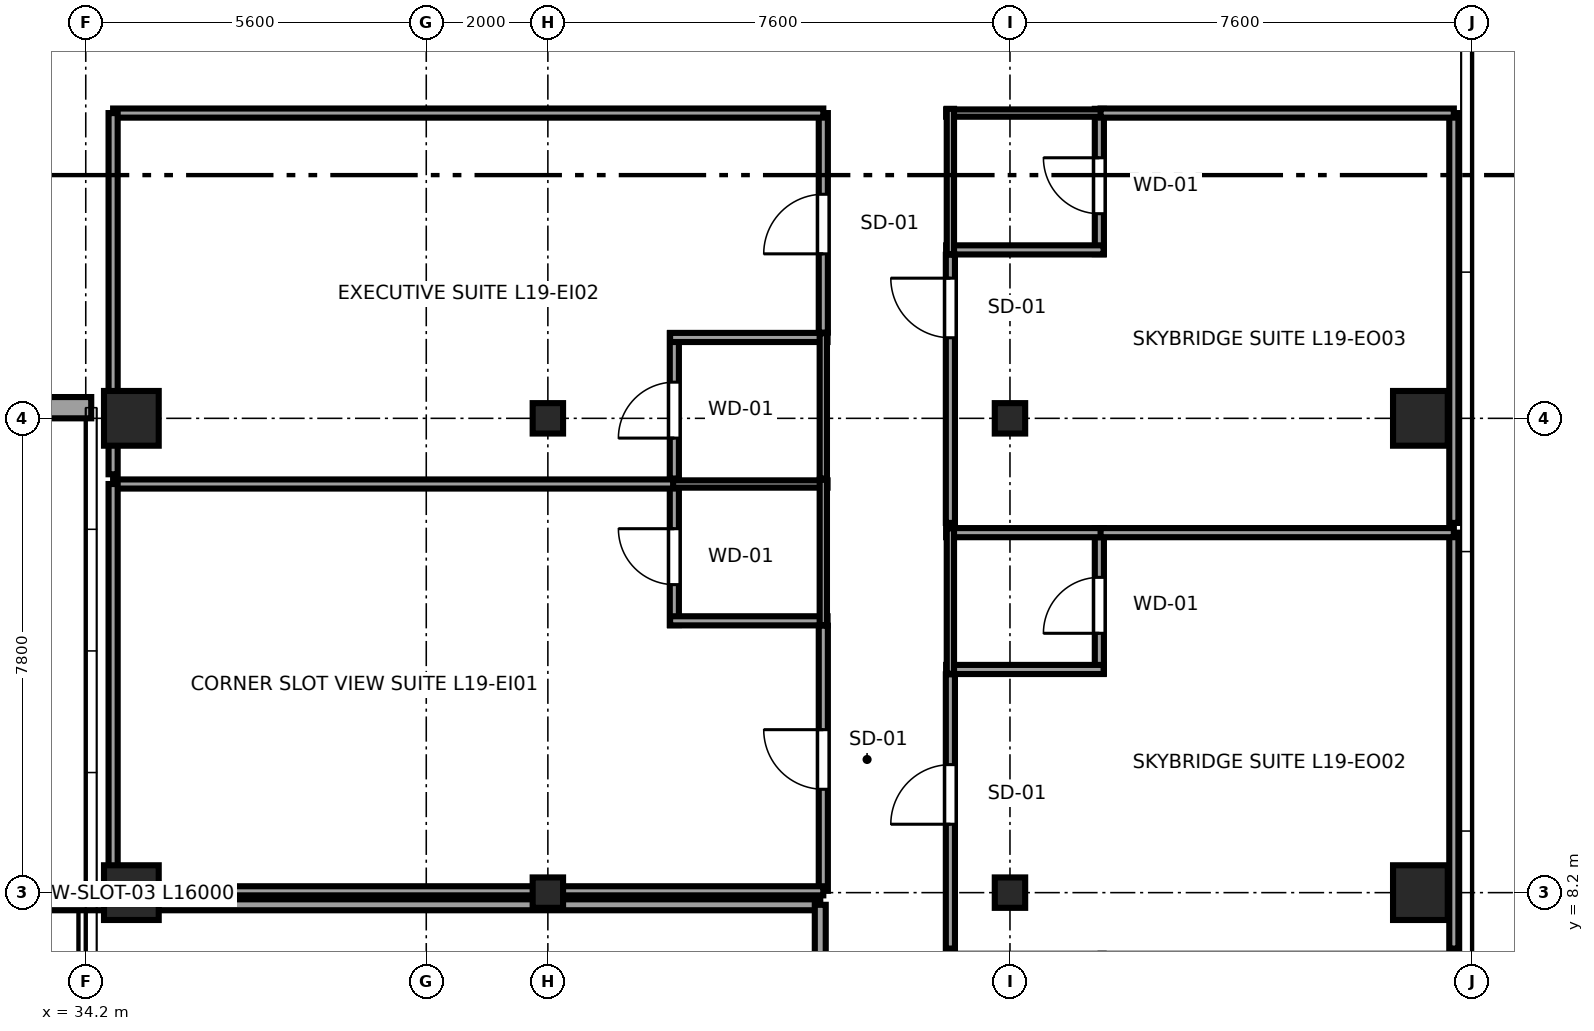
"""IFC4 building model, lengths in metres.
Left out: names, types, materials, properties, quantities, classifications, styles, units other than length and angle.
Written with IfcOpenShell. Run it as: python <this file> out.ifc"""

import sys

from ifc_helpers import new_model, si_unit, direction, frame, frame_2d, origin, origin_2d, place, context, subcontext, project, spatial, rectangle, i_section, extrude, source, transform, mapped, element, fill, save


model = new_model("IFC4")
c1 = context("Model", 3, precision=1e-05, world=origin(), true_north=direction((0.0, 1.0)))
c2 = subcontext(c1, "Body", "Model", "MODEL_VIEW")
j1 = project(units=[si_unit("LENGTHUNIT", "METRE"), si_unit("PLANEANGLEUNIT", "RADIAN")], contexts=[c1])
p1 = place(None, origin())
s1 = spatial("IfcSite", under=j1, at=p1, CompositionType="ELEMENT")
p2 = place(p1, origin())
s2 = spatial("IfcBuilding", under=s1, at=p2, CompositionType="ELEMENT")
p3 = place(p2, frame((0.0, 0.0, 78.15)))
s3 = spatial("IfcBuildingStorey", under=s2, at=p3, CompositionType="ELEMENT", Elevation=78.15)
m1 = source(origin(), c2, "Body", "SweptSolid", [
    extrude(rectangle(XDim=0.9, YDim=0.9, at=origin_2d()), origin(), (0.0, 0.0, 1.0), 3.55),
])
for number, where, z_axis, x_axis in (
    (1, (34.95, 8.2, 0.0), (0.0, 0.0, 1.0), (1.0, 0.0, 0.0)),
    (2, (34.95, 16.0, 0.0), (0.0, 0.0, 1.0), (1.0, 0.0, 0.0)),
):
    element("IfcColumn", number, at=place(p3, frame(where, z_axis=z_axis, x_axis=x_axis)), inside=s3, PredefinedType="COLUMN", context=c2, shape_type="MappedRepresentation", body=[
        mapped(m1, transform((0.0, 0.0, 0.0), x_axis=(1.0, 0.0, 0.0), y_axis=(0.0, 1.0, 0.0), z_axis=(0.0, 0.0, 1.0), scale=1.0)),
    ])
m2 = source(origin(), c2, "Body", "SweptSolid", [
    extrude(i_section(OverallWidth=0.5, OverallDepth=0.5, WebThickness=0.022, FlangeThickness=0.034, at=origin_2d()), origin(), (0.0, 0.0, 1.0), 3.55),
])
for number, where, z_axis, x_axis in (
    (3, (41.8, 8.2, 0.0), (0.0, 0.0, 1.0), (1.0, 0.0, 0.0)),
    (4, (41.8, 16.0, 0.0), (0.0, 0.0, 1.0), (1.0, 0.0, 0.0)),
    (5, (49.4, 8.2, 0.0), (0.0, 0.0, 1.0), (1.0, 0.0, 0.0)),
    (6, (49.4, 16.0, 0.0), (0.0, 0.0, 1.0), (1.0, 0.0, 0.0)),
):
    element("IfcColumn", number, at=place(p3, frame(where, z_axis=z_axis, x_axis=x_axis)), inside=s3, PredefinedType="COLUMN", context=c2, shape_type="MappedRepresentation", body=[
        mapped(m2, transform((0.0, 0.0, 0.0), x_axis=(1.0, 0.0, 0.0), y_axis=(0.0, 1.0, 0.0), z_axis=(0.0, 0.0, 1.0), scale=1.0)),
    ])
for number, where, z_axis, x_axis in (
    (7, (56.15, 8.2, 0.0), (0.0, 0.0, 1.0), (1.0, 0.0, 0.0)),
    (8, (56.15, 16.0, 0.0), (0.0, 0.0, 1.0), (1.0, 0.0, 0.0)),
):
    element("IfcColumn", number, at=place(p3, frame(where, z_axis=z_axis, x_axis=x_axis)), inside=s3, PredefinedType="COLUMN", context=c2, shape_type="MappedRepresentation", body=[
        mapped(m1, transform((0.0, 0.0, 0.0), x_axis=(1.0, 0.0, 0.0), y_axis=(0.0, 1.0, 0.0), z_axis=(0.0, 0.0, 1.0), scale=1.0)),
    ])
p4 = place(p3, frame((22.71, 16.175, 0.0), z_axis=(0.0, 0.0, 1.0), x_axis=(1.0, 0.0, 0.0)))
e9 = element("IfcWall", 9, at=p4, inside=s3, PredefinedType="SOLIDWALL", context=c2, shape_type="SweptSolid", body=[
    extrude(rectangle(XDim=11.58, YDim=0.35, at=frame_2d((5.79, 0.0))), origin(), (0.0, 0.0, 1.0), 2.748),
])
p5 = place(p4, frame((2.22, 0.0, 0.68)))
e10 = element("IfcOpeningElement", 10, at=p5, cuts=e9, PredefinedType="OPENING", context=c2, shape_type="SweptSolid", body=[
    extrude(rectangle(XDim=1.95, YDim=1.82, at=frame_2d((0.975, 0.91))), frame((0.0, 0.185, 0.0), z_axis=(0.0, -1.0, 0.0), x_axis=(1.0, 0.0, 0.0)), (0.0, 0.0, 1.0), 0.37),
])
p6 = place(p4, frame((7.41, 0.0, 0.68)))
e11 = element("IfcOpeningElement", 11, at=p6, cuts=e9, PredefinedType="OPENING", context=c2, shape_type="SweptSolid", body=[
    extrude(rectangle(XDim=1.95, YDim=1.82, at=frame_2d((0.975, 0.91))), frame((0.0, 0.185, 0.0), z_axis=(0.0, -1.0, 0.0), x_axis=(1.0, 0.0, 0.0)), (0.0, 0.0, 1.0), 0.37),
])
p7 = place(p3, frame((43.88, 12.6, 0.0), z_axis=(0.0, 0.0, 1.0), x_axis=(0.0, 1.0, 0.0)))
e12 = element("IfcWall", 12, at=p7, inside=s3, PredefinedType="PARTITIONING", context=c2, shape_type="SweptSolid", body=[
    extrude(rectangle(XDim=2.39, YDim=0.15, at=frame_2d((1.195, 0.0))), origin(), (0.0, 0.0, 1.0), 3.37),
])
p8 = place(p7, frame((0.665, 0.0, 0.0)))
e13 = element("IfcOpeningElement", 13, at=p8, cuts=e12, PredefinedType="OPENING", context=c2, shape_type="SweptSolid", body=[
    extrude(rectangle(XDim=0.92, YDim=2.01, at=frame_2d((0.46, 1.005))), frame((0.0, 0.085, 0.0), z_axis=(0.0, -1.0, 0.0), x_axis=(1.0, 0.0, 0.0)), (0.0, 0.0, 1.0), 0.17),
])
p9 = place(p3, frame((43.81, 12.67, 0.0), z_axis=(0.0, 0.0, 1.0), x_axis=(1.0, 0.0, 0.0)))
e14 = element("IfcWall", 14, at=p9, inside=s3, PredefinedType="PARTITIONING", context=c2, shape_type="SweptSolid", body=[
    extrude(rectangle(XDim=2.59, YDim=0.15, at=frame_2d((1.295, 0.0))), origin(), (0.0, 0.0, 1.0), 3.37),
])
p10 = place(p3, frame((43.81, 14.92, 0.0), z_axis=(0.0, 0.0, 1.0), x_axis=(1.0, 0.0, 0.0)))
e15 = element("IfcWall", 15, at=p10, inside=s3, PredefinedType="PLUMBINGWALL", context=c2, shape_type="SweptSolid", body=[
    extrude(rectangle(XDim=2.59, YDim=0.12, at=frame_2d((1.295, 0.0))), origin(), (0.0, 0.0, 1.0), 3.37),
])
p11 = place(p3, frame((46.33, 12.6, 0.0), z_axis=(0.0, 0.0, 1.0), x_axis=(0.0, 1.0, 0.0)))
e16 = element("IfcWall", 16, at=p11, inside=s3, PredefinedType="PLUMBINGWALL", context=c2, shape_type="SweptSolid", body=[
    extrude(rectangle(XDim=2.39, YDim=0.12, at=frame_2d((1.195, 0.0))), origin(), (0.0, 0.0, 1.0), 3.37),
])
p12 = place(p3, frame((43.88, 15.01, 0.0), z_axis=(0.0, 0.0, 1.0), x_axis=(0.0, 1.0, 0.0)))
e17 = element("IfcWall", 17, at=p12, inside=s3, PredefinedType="PARTITIONING", context=c2, shape_type="SweptSolid", body=[
    extrude(rectangle(XDim=2.39, YDim=0.15, at=frame_2d((1.195, 0.0))), origin(), (0.0, 0.0, 1.0), 3.37),
])
p13 = place(p12, frame((0.665, 0.0, 0.0)))
e18 = element("IfcOpeningElement", 18, at=p13, cuts=e17, PredefinedType="OPENING", context=c2, shape_type="SweptSolid", body=[
    extrude(rectangle(XDim=0.92, YDim=2.01, at=frame_2d((0.46, 1.005))), frame((0.0, 0.085, 0.0), z_axis=(0.0, -1.0, 0.0), x_axis=(1.0, 0.0, 0.0)), (0.0, 0.0, 1.0), 0.17),
])
p14 = place(p3, frame((43.81, 17.33, 0.0), z_axis=(0.0, 0.0, 1.0), x_axis=(1.0, 0.0, 0.0)))
e19 = element("IfcWall", 19, at=p14, inside=s3, PredefinedType="PARTITIONING", context=c2, shape_type="SweptSolid", body=[
    extrude(rectangle(XDim=2.59, YDim=0.15, at=frame_2d((1.295, 0.0))), origin(), (0.0, 0.0, 1.0), 3.37),
])
p15 = place(p3, frame((46.33, 15.01, 0.0), z_axis=(0.0, 0.0, 1.0), x_axis=(0.0, 1.0, 0.0)))
e20 = element("IfcWall", 20, at=p15, inside=s3, PredefinedType="PLUMBINGWALL", context=c2, shape_type="SweptSolid", body=[
    extrude(rectangle(XDim=2.39, YDim=0.12, at=frame_2d((1.195, 0.0))), origin(), (0.0, 0.0, 1.0), 3.37),
])
p16 = place(p3, frame((50.87, 11.8, 0.0), z_axis=(0.0, 0.0, 1.0), x_axis=(0.0, 1.0, 0.0)))
e21 = element("IfcWall", 21, at=p16, inside=s3, PredefinedType="PARTITIONING", context=c2, shape_type="SweptSolid", body=[
    extrude(rectangle(XDim=2.39, YDim=0.15, at=frame_2d((1.195, 0.0))), origin(), (0.0, 0.0, 1.0), 3.37),
])
p17 = place(p16, frame((0.665, 0.0, 0.0)))
e22 = element("IfcOpeningElement", 22, at=p17, cuts=e21, PredefinedType="OPENING", context=c2, shape_type="SweptSolid", body=[
    extrude(rectangle(XDim=0.92, YDim=2.01, at=frame_2d((0.46, 1.005))), frame((0.0, 0.085, 0.0), z_axis=(0.0, -1.0, 0.0), x_axis=(1.0, 0.0, 0.0)), (0.0, 0.0, 1.0), 0.17),
])
for number, where, z_axis, x_axis in (
    (23, (48.35, 11.87, 0.0), (0.0, 0.0, 1.0), (1.0, 0.0, 0.0)),
    (24, (48.35, 14.12, 0.0), (0.0, 0.0, 1.0), (1.0, 0.0, 0.0)),
):
    element("IfcWall", number, at=place(p3, frame(where, z_axis=z_axis, x_axis=x_axis)), inside=s3, PredefinedType="PARTITIONING", context=c2, shape_type="SweptSolid", body=[
        extrude(rectangle(XDim=2.59, YDim=0.15, at=frame_2d((1.295, 0.0))), origin(), (0.0, 0.0, 1.0), 3.37),
    ])
p18 = place(p3, frame((48.42, 11.8, 0.0), z_axis=(0.0, 0.0, 1.0), x_axis=(0.0, 1.0, 0.0)))
e25 = element("IfcWall", 25, at=p18, inside=s3, PredefinedType="PLUMBINGWALL", context=c2, shape_type="SweptSolid", body=[
    extrude(rectangle(XDim=2.39, YDim=0.12, at=frame_2d((1.195, 0.0))), origin(), (0.0, 0.0, 1.0), 3.37),
])
p19 = place(p3, frame((50.87, 18.7, 0.0), z_axis=(0.0, 0.0, 1.0), x_axis=(0.0, 1.0, 0.0)))
e26 = element("IfcWall", 26, at=p19, inside=s3, PredefinedType="PARTITIONING", context=c2, shape_type="SweptSolid", body=[
    extrude(rectangle(XDim=2.39, YDim=0.15, at=frame_2d((1.195, 0.0))), origin(), (0.0, 0.0, 1.0), 3.37),
])
p20 = place(p19, frame((0.665, 0.0, 0.0)))
e27 = element("IfcOpeningElement", 27, at=p20, cuts=e26, PredefinedType="OPENING", context=c2, shape_type="SweptSolid", body=[
    extrude(rectangle(XDim=0.92, YDim=2.01, at=frame_2d((0.46, 1.005))), frame((0.0, 0.085, 0.0), z_axis=(0.0, -1.0, 0.0), x_axis=(1.0, 0.0, 0.0)), (0.0, 0.0, 1.0), 0.17),
])
p21 = place(p3, frame((48.35, 18.77, 0.0), z_axis=(0.0, 0.0, 1.0), x_axis=(1.0, 0.0, 0.0)))
e28 = element("IfcWall", 28, at=p21, inside=s3, PredefinedType="PARTITIONING", context=c2, shape_type="SweptSolid", body=[
    extrude(rectangle(XDim=2.59, YDim=0.15, at=frame_2d((1.295, 0.0))), origin(), (0.0, 0.0, 1.0), 3.37),
])
p22 = place(p3, frame((48.35, 21.02, 0.0), z_axis=(0.0, 0.0, 1.0), x_axis=(1.0, 0.0, 0.0)))
e29 = element("IfcWall", 29, at=p22, inside=s3, PredefinedType="PLUMBINGWALL", context=c2, shape_type="SweptSolid", body=[
    extrude(rectangle(XDim=2.59, YDim=0.12, at=frame_2d((1.295, 0.0))), origin(), (0.0, 0.0, 1.0), 3.37),
])
p23 = place(p3, frame((48.42, 18.7, 0.0), z_axis=(0.0, 0.0, 1.0), x_axis=(0.0, 1.0, 0.0)))
e30 = element("IfcWall", 30, at=p23, inside=s3, PredefinedType="PLUMBINGWALL", context=c2, shape_type="SweptSolid", body=[
    extrude(rectangle(XDim=2.39, YDim=0.12, at=frame_2d((1.195, 0.0))), origin(), (0.0, 0.0, 1.0), 3.37),
])
p24 = place(p3, frame((46.33, 8.23, 0.0), z_axis=(0.0, 0.0, 1.0), x_axis=(0.0, 1.0, 0.0)))
e31 = element("IfcWall", 31, at=p24, inside=s3, PredefinedType="PARTITIONING", context=c2, shape_type="SweptSolid", body=[
    extrude(rectangle(XDim=4.36, YDim=0.15, at=frame_2d((2.18, 0.0))), origin(), (0.0, 0.0, 1.0), 3.37),
])
p25 = place(p24, frame((1.67, 0.0, 0.0)))
e32 = element("IfcOpeningElement", 32, at=p25, cuts=e31, PredefinedType="OPENING", context=c2, shape_type="SweptSolid", body=[
    extrude(rectangle(XDim=0.98, YDim=2.12, at=frame_2d((0.49, 1.06))), frame((0.0, 0.085, 0.0), z_axis=(0.0, -1.0, 0.0), x_axis=(1.0, 0.0, 0.0)), (0.0, 0.0, 1.0), 0.17),
])
p26 = place(p3, frame((34.65, 8.23, 0.0), z_axis=(0.0, 0.0, 1.0), x_axis=(1.0, 0.0, 0.0)))
e33 = element("IfcWall", 33, at=p26, inside=s3, PredefinedType="PARTITIONING", context=c2, shape_type="SweptSolid", body=[
    extrude(rectangle(XDim=11.68, YDim=0.15, at=frame_2d((5.84, 0.0))), origin(), (0.0, 0.0, 1.0), 2.748),
])
p27 = place(p3, frame((34.65, 14.92, 0.0), z_axis=(0.0, 0.0, 1.0), x_axis=(1.0, 0.0, 0.0)))
e34 = element("IfcWall", 34, at=p27, inside=s3, PredefinedType="PARTITIONING", context=c2, shape_type="SweptSolid", body=[
    extrude(rectangle(XDim=9.21, YDim=0.15, at=frame_2d((4.605, 0.0))), origin(), (0.0, 0.0, 1.0), 3.37),
])
p28 = place(p3, frame((34.65, 8.23, 0.0), z_axis=(0.0, 0.0, 1.0), x_axis=(0.0, 1.0, 0.0)))
e35 = element("IfcWall", 35, at=p28, inside=s3, PredefinedType="PARTITIONING", context=c2, shape_type="SweptSolid", body=[
    extrude(rectangle(XDim=6.69, YDim=0.15, at=frame_2d((3.345, 0.0))), origin(), (0.0, 0.0, 1.0), 3.37),
])
p29 = place(p3, frame((46.33, 17.41, 0.0), z_axis=(0.0, 0.0, 1.0), x_axis=(0.0, 1.0, 0.0)))
e36 = element("IfcWall", 36, at=p29, inside=s3, PredefinedType="PARTITIONING", context=c2, shape_type="SweptSolid", body=[
    extrude(rectangle(XDim=3.61, YDim=0.15, at=frame_2d((1.805, 0.0))), origin(), (0.0, 0.0, 1.0), 3.37),
])
p30 = place(p29, frame((1.295, 0.0, 0.0)))
e37 = element("IfcOpeningElement", 37, at=p30, cuts=e36, PredefinedType="OPENING", context=c2, shape_type="SweptSolid", body=[
    extrude(rectangle(XDim=0.98, YDim=2.12, at=frame_2d((0.49, 1.06))), frame((0.0, 0.085, 0.0), z_axis=(0.0, -1.0, 0.0), x_axis=(1.0, 0.0, 0.0)), (0.0, 0.0, 1.0), 0.17),
])
p31 = place(p3, frame((34.65, 21.02, 0.0), z_axis=(0.0, 0.0, 1.0), x_axis=(1.0, 0.0, 0.0)))
e38 = element("IfcWall", 38, at=p31, inside=s3, PredefinedType="PARTITIONING", context=c2, shape_type="SweptSolid", body=[
    extrude(rectangle(XDim=11.68, YDim=0.15, at=frame_2d((5.84, 0.0))), origin(), (0.0, 0.0, 1.0), 3.37),
])
p32 = place(p3, frame((34.65, 15.08, 0.0), z_axis=(0.0, 0.0, 1.0), x_axis=(0.0, 1.0, 0.0)))
e39 = element("IfcWall", 39, at=p32, inside=s3, PredefinedType="PARTITIONING", context=c2, shape_type="SweptSolid", body=[
    extrude(rectangle(XDim=5.94, YDim=0.15, at=frame_2d((2.97, 0.0))), origin(), (0.0, 0.0, 1.0), 3.37),
])
p33 = place(p3, frame((48.42, 7.28, 0.0), z_axis=(0.0, 0.0, 1.0), x_axis=(0.0, 1.0, 0.0)))
e40 = element("IfcWall", 40, at=p33, inside=s3, PredefinedType="PARTITIONING", context=c2, shape_type="SweptSolid", body=[
    extrude(rectangle(XDim=4.51, YDim=0.15, at=frame_2d((2.255, 0.0))), origin(), (0.0, 0.0, 1.0), 3.37),
])
p34 = place(p33, frame((2.045, 0.0, 0.0)))
e41 = element("IfcOpeningElement", 41, at=p34, cuts=e40, PredefinedType="OPENING", context=c2, shape_type="SweptSolid", body=[
    extrude(rectangle(XDim=0.98, YDim=2.12, at=frame_2d((0.49, 1.06))), frame((0.0, 0.085, 0.0), z_axis=(0.0, -1.0, 0.0), x_axis=(1.0, 0.0, 0.0)), (0.0, 0.0, 1.0), 0.17),
])
p35 = place(p3, frame((56.7, 7.28, 0.0), z_axis=(0.0, 0.0, 1.0), x_axis=(0.0, 1.0, 0.0)))
e42 = element("IfcWall", 42, at=p35, inside=s3, PredefinedType="PARTITIONING", context=c2, shape_type="SweptSolid", body=[
    extrude(rectangle(XDim=6.84, YDim=0.15, at=frame_2d((3.42, 0.0))), origin(), (0.0, 0.0, 1.0), 3.37),
])
p36 = place(p3, frame((50.89, 14.12, 0.0), z_axis=(0.0, 0.0, 1.0), x_axis=(1.0, 0.0, 0.0)))
e43 = element("IfcWall", 43, at=p36, inside=s3, PredefinedType="PARTITIONING", context=c2, shape_type="SweptSolid", body=[
    extrude(rectangle(XDim=5.81, YDim=0.15, at=frame_2d((2.905, 0.0))), origin(), (0.0, 0.0, 1.0), 3.37),
])
p37 = place(p3, frame((48.42, 14.28, 0.0), z_axis=(0.0, 0.0, 1.0), x_axis=(0.0, 1.0, 0.0)))
e44 = element("IfcWall", 44, at=p37, inside=s3, PredefinedType="PARTITIONING", context=c2, shape_type="SweptSolid", body=[
    extrude(rectangle(XDim=4.41, YDim=0.15, at=frame_2d((2.205, 0.0))), origin(), (0.0, 0.0, 1.0), 3.37),
])
p38 = place(p37, frame((3.045, 0.0, 0.0)))
e45 = element("IfcOpeningElement", 45, at=p38, cuts=e44, PredefinedType="OPENING", context=c2, shape_type="SweptSolid", body=[
    extrude(rectangle(XDim=0.98, YDim=2.12, at=frame_2d((0.49, 1.06))), frame((0.0, 0.085, 0.0), z_axis=(0.0, -1.0, 0.0), x_axis=(1.0, 0.0, 0.0)), (0.0, 0.0, 1.0), 0.17),
])
p39 = place(p3, frame((56.7, 14.28, 0.0), z_axis=(0.0, 0.0, 1.0), x_axis=(0.0, 1.0, 0.0)))
e46 = element("IfcWall", 46, at=p39, inside=s3, PredefinedType="PARTITIONING", context=c2, shape_type="SweptSolid", body=[
    extrude(rectangle(XDim=6.74, YDim=0.15, at=frame_2d((3.37, 0.0))), origin(), (0.0, 0.0, 1.0), 3.37),
])
p40 = place(p3, frame((50.89, 21.02, 0.0), z_axis=(0.0, 0.0, 1.0), x_axis=(1.0, 0.0, 0.0)))
e47 = element("IfcWall", 47, at=p40, inside=s3, PredefinedType="PARTITIONING", context=c2, shape_type="SweptSolid", body=[
    extrude(rectangle(XDim=5.81, YDim=0.15, at=frame_2d((2.905, 0.0))), origin(), (0.0, 0.0, 1.0), 3.37),
])
p41 = place(p3, frame((12.27, 8.0, 0.0), z_axis=(0.0, 0.0, 1.0), x_axis=(1.0, 0.0, 0.0)))
e48 = element("IfcWall", 48, at=p41, inside=s3, PredefinedType="PARTITIONING", context=c2, shape_type="SweptSolid", body=[
    extrude(rectangle(XDim=34.01, YDim=0.18, at=frame_2d((17.005, 0.0))), origin(), (0.0, 0.0, 1.0), 3.37),
])
p42 = place(p3, frame((46.28, 2.6, 0.0), z_axis=(0.0, 0.0, 1.0), x_axis=(0.0, 1.0, 0.0)))
e49 = element("IfcWall", 49, at=p42, inside=s3, PredefinedType="PARTITIONING", context=c2, shape_type="SweptSolid", body=[
    extrude(rectangle(XDim=5.4, YDim=0.18, at=frame_2d((2.7, 0.0))), origin(), (0.0, 0.0, 1.0), 3.37),
])
m3 = source(origin(), c2, "Body", "SweptSolid", [
    extrude(rectangle(XDim=0.92, YDim=2.01, at=frame_2d((0.46, 1.005))), frame((0.0, 0.025, 0.0), z_axis=(0.0, -1.0, 0.0), x_axis=(1.0, 0.0, 0.0)), (0.0, 0.0, 1.0), 0.05),
])
p43 = place(p8, origin())
e50 = element("IfcDoor", 50, at=p43, inside=s3, OperationType="SINGLE_SWING_RIGHT", PredefinedType="DOOR", context=c2, shape_type="MappedRepresentation", body=[
    mapped(m3, transform((0.0, 0.0, 0.0), x_axis=(1.0, 0.0, 0.0), y_axis=(0.0, 1.0, 0.0), z_axis=(0.0, 0.0, 1.0), scale=1.0)),
])
fill(e13, e50)
p44 = place(p13, origin())
e51 = element("IfcDoor", 51, at=p44, inside=s3, OperationType="SINGLE_SWING_LEFT", PredefinedType="DOOR", context=c2, shape_type="MappedRepresentation", body=[
    mapped(m3, transform((0.0, 0.0, 0.0), x_axis=(1.0, 0.0, 0.0), y_axis=(0.0, 1.0, 0.0), z_axis=(0.0, 0.0, 1.0), scale=1.0)),
])
fill(e18, e51)
p45 = place(p17, origin())
e52 = element("IfcDoor", 52, at=p45, inside=s3, OperationType="SINGLE_SWING_LEFT", PredefinedType="DOOR", context=c2, shape_type="MappedRepresentation", body=[
    mapped(m3, transform((0.0, 0.0, 0.0), x_axis=(1.0, 0.0, 0.0), y_axis=(0.0, 1.0, 0.0), z_axis=(0.0, 0.0, 1.0), scale=1.0)),
])
fill(e22, e52)
p46 = place(p20, origin())
e53 = element("IfcDoor", 53, at=p46, inside=s3, OperationType="SINGLE_SWING_RIGHT", PredefinedType="DOOR", context=c2, shape_type="MappedRepresentation", body=[
    mapped(m3, transform((0.0, 0.0, 0.0), x_axis=(1.0, 0.0, 0.0), y_axis=(0.0, 1.0, 0.0), z_axis=(0.0, 0.0, 1.0), scale=1.0)),
])
fill(e27, e53)
m4 = source(origin(), c2, "Body", "SweptSolid", [
    extrude(rectangle(XDim=0.98, YDim=2.12, at=frame_2d((0.49, 1.06))), frame((0.0, 0.025, 0.0), z_axis=(0.0, -1.0, 0.0), x_axis=(1.0, 0.0, 0.0)), (0.0, 0.0, 1.0), 0.05),
])
p47 = place(p25, origin())
e54 = element("IfcDoor", 54, at=p47, inside=s3, OperationType="SINGLE_SWING_RIGHT", PredefinedType="DOOR", context=c2, shape_type="MappedRepresentation", body=[
    mapped(m4, transform((0.0, 0.0, 0.0), x_axis=(1.0, 0.0, 0.0), y_axis=(0.0, 1.0, 0.0), z_axis=(0.0, 0.0, 1.0), scale=1.0)),
])
fill(e32, e54)
p48 = place(p30, origin())
e55 = element("IfcDoor", 55, at=p48, inside=s3, OperationType="SINGLE_SWING_LEFT", PredefinedType="DOOR", context=c2, shape_type="MappedRepresentation", body=[
    mapped(m4, transform((0.0, 0.0, 0.0), x_axis=(1.0, 0.0, 0.0), y_axis=(0.0, 1.0, 0.0), z_axis=(0.0, 0.0, 1.0), scale=1.0)),
])
fill(e37, e55)
p49 = place(p34, origin())
e56 = element("IfcDoor", 56, at=p49, inside=s3, OperationType="SINGLE_SWING_LEFT", PredefinedType="DOOR", context=c2, shape_type="MappedRepresentation", body=[
    mapped(m4, transform((0.0, 0.0, 0.0), x_axis=(1.0, 0.0, 0.0), y_axis=(0.0, 1.0, 0.0), z_axis=(0.0, 0.0, 1.0), scale=1.0)),
])
fill(e41, e56)
p50 = place(p38, origin())
e57 = element("IfcDoor", 57, at=p50, inside=s3, OperationType="SINGLE_SWING_RIGHT", PredefinedType="DOOR", context=c2, shape_type="MappedRepresentation", body=[
    mapped(m4, transform((0.0, 0.0, 0.0), x_axis=(1.0, 0.0, 0.0), y_axis=(0.0, 1.0, 0.0), z_axis=(0.0, 0.0, 1.0), scale=1.0)),
])
fill(e45, e57)
save(model, sys.argv[1])
